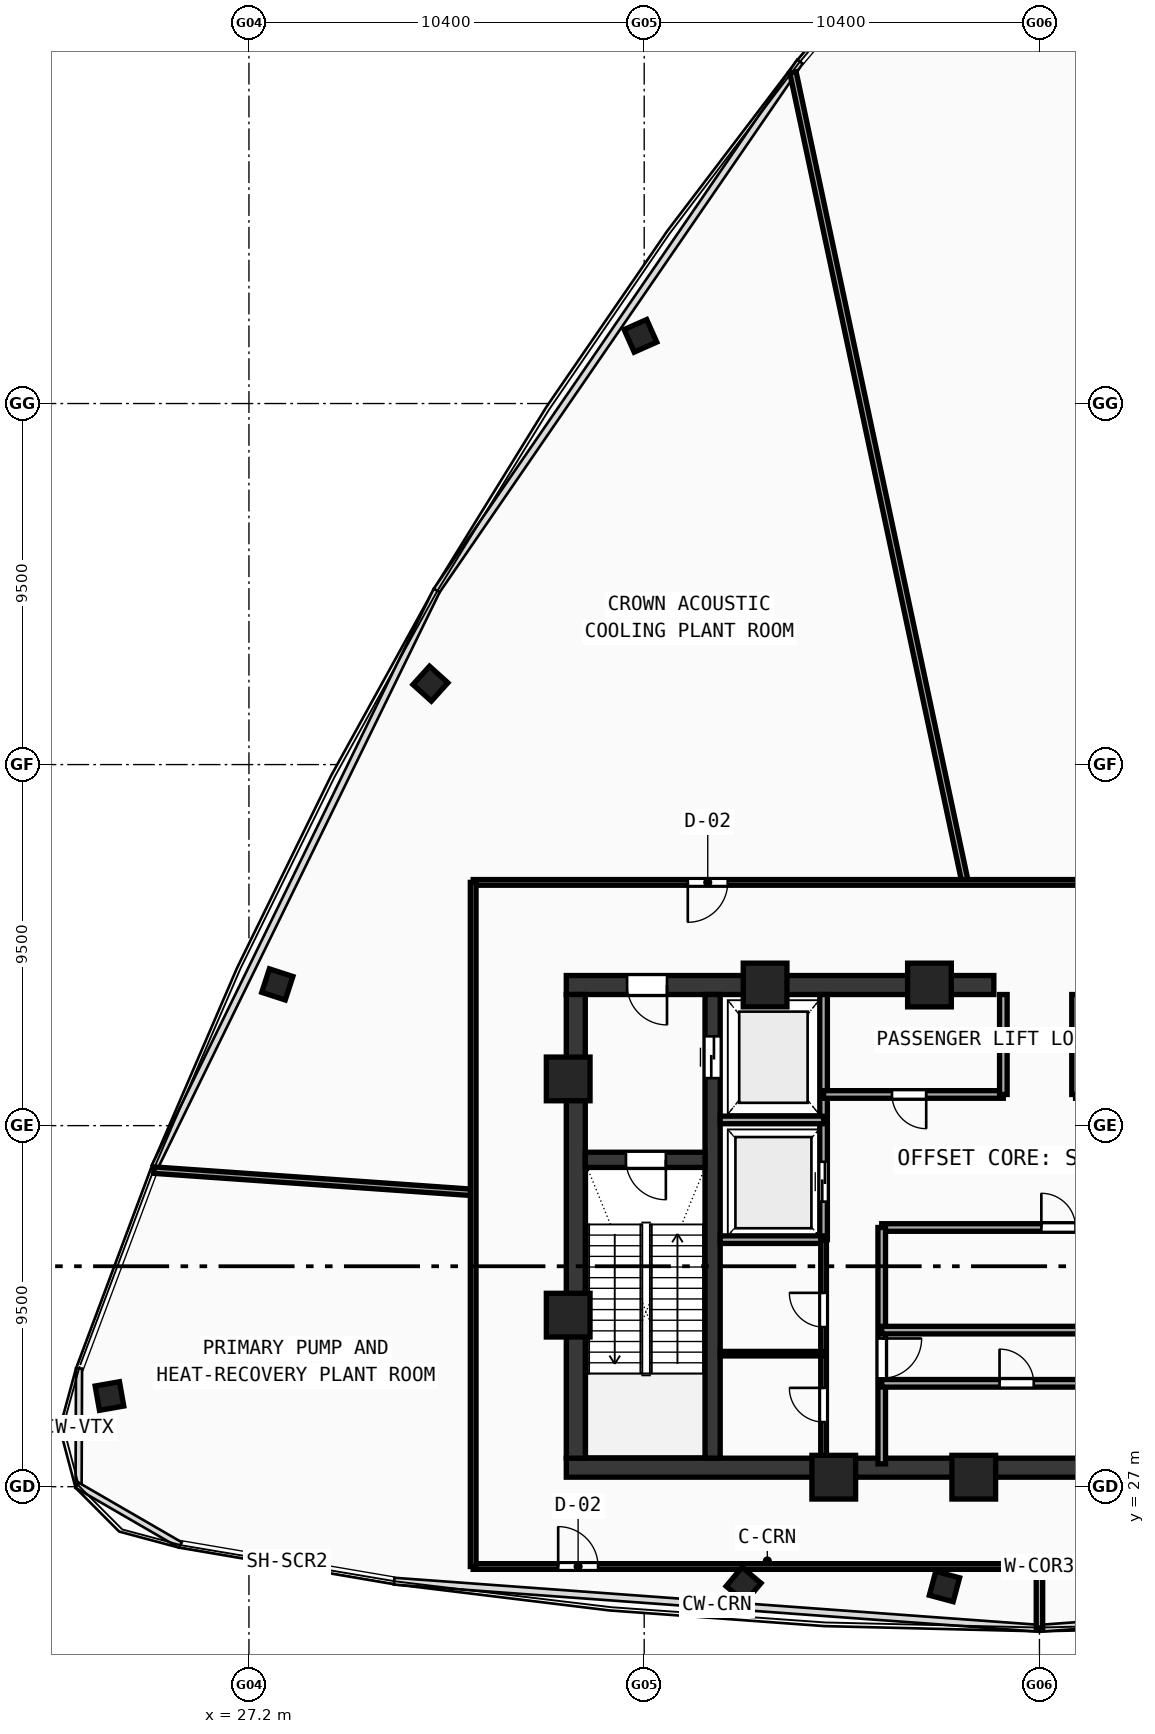
"""IFC4 building model, lengths in metres.
Left out: names, types, materials, properties, quantities, classifications, styles, units other than length and angle.
Written with IfcOpenShell. Run it as: python <this file> out.ifc"""

import sys

from ifc_helpers import new_model, si_unit, direction, frame, frame_2d, origin, origin_with_axes, origin_2d, place, context, subcontext, project, spatial, rectangle, hollow_rectangle, extrude, source, transform, mapped, element, fill, save


model = new_model("IFC4")
c1 = context("Model", 3, precision=1e-05, world=origin(), true_north=direction((0.0, 1.0)))
c2 = subcontext(c1, "Body", "Model", "MODEL_VIEW")
j1 = project(units=[si_unit("LENGTHUNIT", "METRE"), si_unit("PLANEANGLEUNIT", "RADIAN")], contexts=[c1])
p1 = place(None, origin())
s1 = spatial("IfcSite", under=j1, at=p1, CompositionType="ELEMENT")
p2 = place(p1, origin())
s2 = spatial("IfcBuilding", under=s1, at=p2, CompositionType="ELEMENT")
p3 = place(p2, frame((0.0, 0.0, 386.76)))
s3 = spatial("IfcBuildingStorey", under=s2, at=p3, CompositionType="ELEMENT", Elevation=386.76)
p4 = place(p3, frame((35.55, 27.5, 0.0), z_axis=(0.0, 0.0, 1.0), x_axis=(1.0, 0.0, 0.0)))
e1 = element("IfcWall", 1, at=p4, inside=s3, PredefinedType="SHEAR", context=c2, shape_type="SweptSolid", body=[
    extrude(rectangle(XDim=24.9, YDim=0.5, at=frame_2d((12.45, 0.0))), origin(), (0.0, 0.0, 1.0), 4.72),
])
p5 = place(p3, frame((35.55, 40.2, 0.0), z_axis=(0.0, 0.0, 1.0), x_axis=(1.0, 0.0, 0.0)))
e2 = element("IfcWall", 2, at=p5, inside=s3, PredefinedType="SHEAR", context=c2, shape_type="SweptSolid", body=[
    extrude(rectangle(XDim=11.25, YDim=0.5, at=frame_2d((5.625, 0.0))), origin(), (0.0, 0.0, 1.0), 4.72),
])
p6 = place(p5, frame((1.6, 0.0, 0.0)))
e3 = element("IfcOpeningElement", 3, at=p6, cuts=e2, PredefinedType="OPENING", context=c2, shape_type="SweptSolid", body=[
    extrude(rectangle(XDim=1.05, YDim=2.1, at=frame_2d((0.525, 1.05))), frame((0.0, 0.26, 0.0), z_axis=(0.0, -1.0, 0.0), x_axis=(1.0, 0.0, 0.0)), (0.0, 0.0, 1.0), 0.52),
])
p7 = place(p3, frame((35.8, 27.75, 0.0), z_axis=(0.0, 0.0, 1.0), x_axis=(0.0, 1.0, 0.0)))
e4 = element("IfcWall", 4, at=p7, inside=s3, PredefinedType="SHEAR", context=c2, shape_type="SweptSolid", body=[
    extrude(rectangle(XDim=12.2, YDim=0.5, at=frame_2d((6.1, 0.0))), origin(), (0.0, 0.0, 1.0), 4.72),
])
p8 = place(p3, frame((39.4, 27.75, 0.0), z_axis=(0.0, 0.0, 1.0), x_axis=(0.0, 1.0, 0.0)))
e5 = element("IfcWall", 5, at=p8, inside=s3, PredefinedType="SHEAR", context=c2, shape_type="SweptSolid", body=[
    extrude(rectangle(XDim=12.2, YDim=0.4, at=frame_2d((6.1, 0.0))), origin(), (0.0, 0.0, 1.0), 4.72),
])
p9 = place(p8, frame((10.0, 0.0, 0.0)))
e6 = element("IfcOpeningElement", 6, at=p9, cuts=e5, PredefinedType="OPENING", context=c2, shape_type="SweptSolid", body=[
    extrude(rectangle(XDim=1.1, YDim=2.1, at=frame_2d((0.55, 1.05))), frame((0.0, 0.21, 0.0), z_axis=(0.0, -1.0, 0.0), x_axis=(1.0, 0.0, 0.0)), (0.0, 0.0, 1.0), 0.42),
])
p10 = place(p3, frame((36.05, 35.6, 0.0), z_axis=(0.0, 0.0, 1.0), x_axis=(1.0, 0.0, 0.0)))
e7 = element("IfcWall", 7, at=p10, inside=s3, PredefinedType="SHEAR", context=c2, shape_type="SweptSolid", body=[
    extrude(rectangle(XDim=3.15, YDim=0.4, at=frame_2d((1.575, 0.0))), origin(), (0.0, 0.0, 1.0), 4.72),
])
p11 = place(p10, frame((1.07, 0.0, 0.0)))
e8 = element("IfcOpeningElement", 8, at=p11, cuts=e7, PredefinedType="OPENING", context=c2, shape_type="SweptSolid", body=[
    extrude(rectangle(XDim=1.05, YDim=2.1, at=frame_2d((0.525, 1.05))), frame((0.0, 0.21, 0.0), z_axis=(0.0, -1.0, 0.0), x_axis=(1.0, 0.0, 0.0)), (0.0, 0.0, 1.0), 0.42),
])
m1 = source(origin(), c2, "Body", "SweptSolid", [
    extrude(hollow_rectangle(XDim=1.15, YDim=1.15, WallThickness=0.048, at=origin_2d()), origin(), (0.0, 0.0, 1.0), 5.0),
])
for number, where, z_axis, x_axis in (
    (9, (42.588, 27.25, -0.28), (0.0, 0.0, 1.0), (1.0, 0.0, 0.0)),
    (10, (46.272, 27.25, -0.28), (0.0, 0.0, 1.0), (1.0, 0.0, 0.0)),
    (11, (45.106, 40.2, -0.28), (0.0, 0.0, 1.0), (1.0, 0.0, 0.0)),
    (12, (40.781, 40.2, -0.28), (0.0, 0.0, 1.0), (1.0, 0.0, 0.0)),
    (13, (35.6, 37.729, -0.28), (0.0, 0.0, 1.0), (1.0, 0.0, 0.0)),
    (14, (35.6, 31.513, -0.28), (0.0, 0.0, 1.0), (1.0, 0.0, 0.0)),
):
    element("IfcColumn", number, at=place(p3, frame(where, z_axis=z_axis, x_axis=x_axis)), inside=s3, PredefinedType="COLUMN", context=c2, shape_type="MappedRepresentation", body=[
        mapped(m1, transform((0.0, 0.0, 0.0), scale=1.0)),
    ])
m2 = source(origin(), c2, "Body", "SweptSolid", [
    extrude(hollow_rectangle(XDim=0.65, YDim=0.65, WallThickness=0.024, at=origin_2d()), origin(), (0.0, 0.0, 1.0), 5.0),
])
for number, where, z_axis, x_axis in (
    (15, (40.215, 24.422, -0.28), (0.0, 0.0, 1.0), (0.766, -0.643, 0.0)),
    (16, (45.501, 24.373, -0.28), (0.0, 0.0, 1.0), (0.966, -0.259, 0.0)),
    (17, (37.501, 57.281, -0.28), (0.0, 0.0, 1.0), (-0.914, -0.407, 0.0)),
    (18, (31.975, 48.129, -0.28), (0.0, 0.0, 1.0), (-0.669, -0.743, 0.0)),
    (19, (27.947, 40.216, -0.28), (0.0, 0.0, 1.0), (-0.309, -0.951, 0.0)),
    (20, (23.53, 29.385, -0.28), (0.0, 0.0, 1.0), (0.174, -0.985, 0.0)),
):
    element("IfcColumn", number, at=place(p3, frame(where, z_axis=z_axis, x_axis=x_axis)), inside=s3, PredefinedType="COLUMN", context=c2, shape_type="MappedRepresentation", body=[
        mapped(m2, transform((0.0, 0.0, 0.0), scale=1.0)),
    ])
p12 = place(p3, frame((42.32, 33.5, 0.0), z_axis=(0.0, 0.0, 1.0), x_axis=(0.0, 1.0, 0.0)))
e21 = element("IfcWall", 21, at=p12, inside=s3, PredefinedType="SOLIDWALL", context=c2, shape_type="SweptSolid", body=[
    extrude(rectangle(XDim=6.45, YDim=0.2, at=frame_2d((3.225, 0.0))), origin(), (0.0, 0.0, 1.0), 4.72),
])
p13 = place(p12, frame((1.0, 0.0, 0.0)))
e22 = element("IfcOpeningElement", 22, at=p13, cuts=e21, PredefinedType="OPENING", context=c2, shape_type="SweptSolid", body=[
    extrude(rectangle(XDim=1.05, YDim=2.1, at=frame_2d((0.525, 1.05))), frame((0.0, 0.11, 0.0), z_axis=(0.0, -1.0, 0.0), x_axis=(1.0, 0.0, 0.0)), (0.0, 0.0, 1.0), 0.22),
])
for number, where, z_axis, x_axis in (
    (23, (39.6, 36.65, 0.0), (0.0, 0.0, 1.0), (1.0, 0.0, 0.0)),
    (24, (39.6, 33.5, 0.0), (0.0, 0.0, 1.0), (1.0, 0.0, 0.0)),
):
    element("IfcWall", number, at=place(p3, frame(where, z_axis=z_axis, x_axis=x_axis)), inside=s3, PredefinedType="SOLIDWALL", context=c2, shape_type="SweptSolid", body=[
        extrude(rectangle(XDim=2.72, YDim=0.2, at=frame_2d((1.36, 0.0))), origin(), (0.0, 0.0, 1.0), 4.72),
    ])
p14 = place(p3, frame((42.32, 37.32, 0.0), z_axis=(0.0, 0.0, 1.0), x_axis=(1.0, 0.0, 0.0)))
e25 = element("IfcWall", 25, at=p14, inside=s3, PredefinedType="SOLIDWALL", context=c2, shape_type="SweptSolid", body=[
    extrude(rectangle(XDim=4.73, YDim=0.2, at=frame_2d((2.365, 0.0))), origin(), (0.0, 0.0, 1.0), 4.72),
])
p15 = place(p14, frame((1.8, 0.0, 0.0)))
e26 = element("IfcOpeningElement", 26, at=p15, cuts=e25, PredefinedType="OPENING", context=c2, shape_type="SweptSolid", body=[
    extrude(rectangle(XDim=0.9, YDim=2.1, at=frame_2d((0.45, 1.05))), frame((0.0, 0.11, 0.0), z_axis=(0.0, -1.0, 0.0), x_axis=(1.0, 0.0, 0.0)), (0.0, 0.0, 1.0), 0.22),
])
for number, where, z_axis, x_axis in (
    (27, (47.05, 37.32, 0.0), (0.0, 0.0, 1.0), (0.0, 1.0, 0.0)),
    (28, (48.95, 37.32, 0.0), (0.0, 0.0, 1.0), (0.0, 1.0, 0.0)),
):
    element("IfcWall", number, at=place(p3, frame(where, z_axis=z_axis, x_axis=x_axis)), inside=s3, PredefinedType="SOLIDWALL", context=c2, shape_type="SweptSolid", body=[
        extrude(rectangle(XDim=2.63, YDim=0.2, at=frame_2d((1.315, 0.0))), origin(), (0.0, 0.0, 1.0), 4.72),
    ])
p16 = place(p3, frame((43.85, 33.82, 0.0), z_axis=(0.0, 0.0, 1.0), x_axis=(1.0, 0.0, 0.0)))
e29 = element("IfcWall", 29, at=p16, inside=s3, PredefinedType="SOLIDWALL", context=c2, shape_type="SweptSolid", body=[
    extrude(rectangle(XDim=9.83, YDim=0.2, at=frame_2d((4.915, 0.0))), origin(), (0.0, 0.0, 1.0), 4.72),
])
p17 = place(p16, frame((4.2, 0.0, 0.0)))
e30 = element("IfcOpeningElement", 30, at=p17, cuts=e29, PredefinedType="OPENING", context=c2, shape_type="SweptSolid", body=[
    extrude(rectangle(XDim=0.9, YDim=2.1, at=frame_2d((0.45, 1.05))), frame((0.0, 0.11, 0.0), z_axis=(0.0, -1.0, 0.0), x_axis=(1.0, 0.0, 0.0)), (0.0, 0.0, 1.0), 0.22),
])
p18 = place(p3, frame((43.85, 27.6, 0.0), z_axis=(0.0, 0.0, 1.0), x_axis=(0.0, 1.0, 0.0)))
e31 = element("IfcWall", 31, at=p18, inside=s3, PredefinedType="SOLIDWALL", context=c2, shape_type="SweptSolid", body=[
    extrude(rectangle(XDim=6.22, YDim=0.2, at=frame_2d((3.11, 0.0))), origin(), (0.0, 0.0, 1.0), 4.72),
])
p19 = place(p18, frame((2.25, 0.0, 0.0)))
e32 = element("IfcOpeningElement", 32, at=p19, cuts=e31, PredefinedType="OPENING", context=c2, shape_type="SweptSolid", body=[
    extrude(rectangle(XDim=1.05, YDim=2.1, at=frame_2d((0.525, 1.05))), frame((0.0, 0.11, 0.0), z_axis=(0.0, -1.0, 0.0), x_axis=(1.0, 0.0, 0.0)), (0.0, 0.0, 1.0), 0.22),
])
p20 = place(p3, frame((43.85, 29.72, 0.0), z_axis=(0.0, 0.0, 1.0), x_axis=(1.0, 0.0, 0.0)))
e33 = element("IfcWall", 33, at=p20, inside=s3, PredefinedType="SOLIDWALL", context=c2, shape_type="SweptSolid", body=[
    extrude(rectangle(XDim=7.2, YDim=0.2, at=frame_2d((3.6, 0.0))), origin(), (0.0, 0.0, 1.0), 4.72),
])
p21 = place(p20, frame((3.1, 0.0, 0.0)))
e34 = element("IfcOpeningElement", 34, at=p21, cuts=e33, PredefinedType="OPENING", context=c2, shape_type="SweptSolid", body=[
    extrude(rectangle(XDim=0.9, YDim=2.1, at=frame_2d((0.45, 1.05))), frame((0.0, 0.11, 0.0), z_axis=(0.0, -1.0, 0.0), x_axis=(1.0, 0.0, 0.0)), (0.0, 0.0, 1.0), 0.22),
])
p22 = place(p3, frame((43.85, 31.12, 0.0), z_axis=(0.0, 0.0, 1.0), x_axis=(1.0, 0.0, 0.0)))
e35 = element("IfcWall", 35, at=p22, inside=s3, PredefinedType="SOLIDWALL", context=c2, shape_type="SweptSolid", body=[
    extrude(rectangle(XDim=9.83, YDim=0.2, at=frame_2d((4.915, 0.0))), origin(), (0.0, 0.0, 1.0), 4.72),
])
p23 = place(p3, frame((42.32, 27.6, 0.0), z_axis=(0.0, 0.0, 1.0), x_axis=(0.0, 1.0, 0.0)))
e36 = element("IfcWall", 36, at=p23, inside=s3, PredefinedType="PARTITIONING", context=c2, shape_type="SweptSolid", body=[
    extrude(rectangle(XDim=5.9, YDim=0.15, at=frame_2d((2.95, 0.0))), origin(), (0.0, 0.0, 1.0), 4.72),
])
p24 = place(p23, frame((1.1, 0.0, 0.0)))
e37 = element("IfcOpeningElement", 37, at=p24, cuts=e36, PredefinedType="OPENING", context=c2, shape_type="SweptSolid", body=[
    extrude(rectangle(XDim=0.9, YDim=2.1, at=frame_2d((0.45, 1.05))), frame((0.0, 0.085, 0.0), z_axis=(0.0, -1.0, 0.0), x_axis=(1.0, 0.0, 0.0)), (0.0, 0.0, 1.0), 0.17),
])
p25 = place(p23, frame((3.6, 0.0, 0.0)))
e38 = element("IfcOpeningElement", 38, at=p25, cuts=e36, PredefinedType="OPENING", context=c2, shape_type="SweptSolid", body=[
    extrude(rectangle(XDim=0.9, YDim=2.1, at=frame_2d((0.45, 1.05))), frame((0.0, 0.085, 0.0), z_axis=(0.0, -1.0, 0.0), x_axis=(1.0, 0.0, 0.0)), (0.0, 0.0, 1.0), 0.17),
])
p26 = place(p3, frame((39.6, 30.5, 0.0), z_axis=(0.0, 0.0, 1.0), x_axis=(1.0, 0.0, 0.0)))
e39 = element("IfcWall", 39, at=p26, inside=s3, PredefinedType="PARTITIONING", context=c2, shape_type="SweptSolid", body=[
    extrude(rectangle(XDim=2.72, YDim=0.12, at=frame_2d((1.36, 0.0))), origin(), (0.0, 0.0, 1.0), 4.72),
])
p27 = place(p3, frame((46.044, 42.9, 0.0), z_axis=(0.0, 0.0, 1.0), x_axis=(-0.207906465553, 0.978148711384, 0.0)))
e40 = element("IfcWall", 40, at=p27, inside=s3, PredefinedType="PARTITIONING", context=c2, shape_type="SweptSolid", body=[
    extrude(rectangle(XDim=21.788, YDim=0.17, at=frame_2d((10.894, 0.0))), origin(), (0.0, 0.0, 1.0), 4.12),
])
p28 = place(p3, frame((33.1, 34.742, 0.0), z_axis=(0.0, 0.0, 1.0), x_axis=(-0.997563993403, 0.069757286835, 0.0)))
e41 = element("IfcWall", 41, at=p28, inside=s3, PredefinedType="PARTITIONING", context=c2, shape_type="SweptSolid", body=[
    extrude(rectangle(XDim=8.421, YDim=0.17, at=frame_2d((4.21, 0.0))), origin(), (0.0, 0.0, 1.0), 4.12),
])
p29 = place(p3, frame((48.0, 24.9, 0.0), z_axis=(0.0, 0.0, 1.0), x_axis=(0.0, -1.0, 0.0)))
e42 = element("IfcWall", 42, at=p29, inside=s3, PredefinedType="PARTITIONING", context=c2, shape_type="SweptSolid", body=[
    extrude(rectangle(XDim=1.616, YDim=0.17, at=frame_2d((0.808, 0.0))), origin(), (0.0, 0.0, 1.0), 4.12),
])
p30 = place(p3, frame((33.1, 24.9, 0.0), z_axis=(0.0, 0.0, 1.0), x_axis=(1.0, 0.0, 0.0)))
e43 = element("IfcWall", 43, at=p30, inside=s3, PredefinedType="PARTITIONING", context=c2, shape_type="SweptSolid", body=[
    extrude(rectangle(XDim=29.8, YDim=0.15, at=frame_2d((14.9, 0.0))), origin(), (0.0, 0.0, 1.0), 4.12),
])
p31 = place(p30, frame((2.236, 0.0, 0.0)))
e44 = element("IfcOpeningElement", 44, at=p31, cuts=e43, PredefinedType="OPENING", context=c2, shape_type="SweptSolid", body=[
    extrude(rectangle(XDim=1.05, YDim=2.1, at=frame_2d((0.525, 1.05))), frame((0.0, 0.085, 0.0), z_axis=(0.0, -1.0, 0.0), x_axis=(1.0, 0.0, 0.0)), (0.0, 0.0, 1.0), 0.17),
])
p32 = place(p30, frame((26.514, 0.0, 0.0)))
e45 = element("IfcOpeningElement", 45, at=p32, cuts=e43, PredefinedType="OPENING", context=c2, shape_type="SweptSolid", body=[
    extrude(rectangle(XDim=1.05, YDim=2.1, at=frame_2d((0.525, 1.05))), frame((0.0, 0.085, 0.0), z_axis=(0.0, -1.0, 0.0), x_axis=(1.0, 0.0, 0.0)), (0.0, 0.0, 1.0), 0.17),
])
p33 = place(p3, frame((62.9, 42.9, 0.0), z_axis=(0.0, 0.0, 1.0), x_axis=(-1.0, 0.0, 0.0)))
e46 = element("IfcWall", 46, at=p33, inside=s3, PredefinedType="PARTITIONING", context=c2, shape_type="SweptSolid", body=[
    extrude(rectangle(XDim=29.8, YDim=0.15, at=frame_2d((14.9, 0.0))), origin(), (0.0, 0.0, 1.0), 4.12),
])
p34 = place(p33, frame((7.603, 0.0, 0.0)))
e47 = element("IfcOpeningElement", 47, at=p34, cuts=e46, PredefinedType="OPENING", context=c2, shape_type="SweptSolid", body=[
    extrude(rectangle(XDim=1.05, YDim=2.1, at=frame_2d((0.525, 1.05))), frame((0.0, 0.085, 0.0), z_axis=(0.0, -1.0, 0.0), x_axis=(1.0, 0.0, 0.0)), (0.0, 0.0, 1.0), 0.17),
])
p35 = place(p33, frame((23.103, 0.0, 0.0)))
e48 = element("IfcOpeningElement", 48, at=p35, cuts=e46, PredefinedType="OPENING", context=c2, shape_type="SweptSolid", body=[
    extrude(rectangle(XDim=1.05, YDim=2.1, at=frame_2d((0.525, 1.05))), frame((0.0, 0.085, 0.0), z_axis=(0.0, -1.0, 0.0), x_axis=(1.0, 0.0, 0.0)), (0.0, 0.0, 1.0), 0.17),
])
p36 = place(p3, frame((33.1, 42.9, 0.0), z_axis=(0.0, 0.0, 1.0), x_axis=(0.0, -1.0, 0.0)))
e49 = element("IfcWall", 49, at=p36, inside=s3, PredefinedType="PARTITIONING", context=c2, shape_type="SweptSolid", body=[
    extrude(rectangle(XDim=18.0, YDim=0.15, at=frame_2d((9.0, 0.0))), origin(), (0.0, 0.0, 1.0), 4.12),
])
m3 = source(origin(), c2, "Body", "SweptSolid", [
    extrude(rectangle(XDim=1.05, YDim=2.1, at=frame_2d((0.525, 1.05))), frame((0.0, 0.025, 0.0), z_axis=(0.0, -1.0, 0.0), x_axis=(1.0, 0.0, 0.0)), (0.0, 0.0, 1.0), 0.05),
])
p37 = place(p11, frame((1.05, 0.0, 0.0), z_axis=(0.0, 0.0, 1.0), x_axis=(-1.0, 0.0, 0.0)))
e50 = element("IfcDoor", 50, at=p37, inside=s3, OperationType="SINGLE_SWING_LEFT", PredefinedType="DOOR", context=c2, shape_type="MappedRepresentation", body=[
    mapped(m3, transform((0.0, 0.0, 0.0), scale=1.0)),
])
fill(e8, e50)
p38 = place(p6, frame((1.05, 0.0, 0.0), z_axis=(0.0, 0.0, 1.0), x_axis=(-1.0, 0.0, 0.0)))
e51 = element("IfcDoor", 51, at=p38, inside=s3, OperationType="SINGLE_SWING_LEFT", PredefinedType="DOOR", context=c2, shape_type="MappedRepresentation", body=[
    mapped(m3, transform((0.0, 0.0, 0.0), scale=1.0)),
])
fill(e3, e51)
m4 = source(origin(), c2, "Body", "SweptSolid", [
    extrude(rectangle(XDim=1.1, YDim=2.1, at=frame_2d((0.55, 1.05))), frame((0.0, 0.025, 0.0), z_axis=(0.0, -1.0, 0.0), x_axis=(1.0, 0.0, 0.0)), (0.0, 0.0, 1.0), 0.05),
])
p39 = place(p9, frame((1.1, 0.0, 0.0), z_axis=(0.0, 0.0, 1.0), x_axis=(-1.0, 0.0, 0.0)))
e52 = element("IfcDoor", 52, at=p39, inside=s3, OperationType="DOUBLE_DOOR_SLIDING", PredefinedType="DOOR", context=c2, shape_type="MappedRepresentation", body=[
    mapped(m4, transform((0.0, 0.0, 0.0), scale=1.0)),
])
fill(e6, e52)
p40 = place(p13, origin_with_axes())
e53 = element("IfcDoor", 53, at=p40, inside=s3, OperationType="DOUBLE_DOOR_SLIDING", PredefinedType="DOOR", context=c2, shape_type="MappedRepresentation", body=[
    mapped(m3, transform((0.0, 0.0, 0.0), scale=1.0)),
])
fill(e22, e53)
m5 = source(origin(), c2, "Body", "SweptSolid", [
    extrude(rectangle(XDim=0.9, YDim=2.1, at=frame_2d((0.45, 1.05))), frame((0.0, 0.025, 0.0), z_axis=(0.0, -1.0, 0.0), x_axis=(1.0, 0.0, 0.0)), (0.0, 0.0, 1.0), 0.05),
])
p41 = place(p15, frame((0.9, 0.0, 0.0), z_axis=(0.0, 0.0, 1.0), x_axis=(-1.0, 0.0, 0.0)))
e54 = element("IfcDoor", 54, at=p41, inside=s3, OperationType="SINGLE_SWING_LEFT", PredefinedType="DOOR", context=c2, shape_type="MappedRepresentation", body=[
    mapped(m5, transform((0.0, 0.0, 0.0), scale=1.0)),
])
fill(e26, e54)
p42 = place(p17, origin_with_axes())
e55 = element("IfcDoor", 55, at=p42, inside=s3, OperationType="SINGLE_SWING_LEFT", PredefinedType="DOOR", context=c2, shape_type="MappedRepresentation", body=[
    mapped(m5, transform((0.0, 0.0, 0.0), scale=1.0)),
])
fill(e30, e55)
p43 = place(p19, frame((1.05, 0.0, 0.0), z_axis=(0.0, 0.0, 1.0), x_axis=(-1.0, 0.0, 0.0)))
e56 = element("IfcDoor", 56, at=p43, inside=s3, OperationType="SINGLE_SWING_LEFT", PredefinedType="DOOR", context=c2, shape_type="MappedRepresentation", body=[
    mapped(m3, transform((0.0, 0.0, 0.0), scale=1.0)),
])
fill(e32, e56)
p44 = place(p21, origin_with_axes())
e57 = element("IfcDoor", 57, at=p44, inside=s3, OperationType="SINGLE_SWING_LEFT", PredefinedType="DOOR", context=c2, shape_type="MappedRepresentation", body=[
    mapped(m5, transform((0.0, 0.0, 0.0), scale=1.0)),
])
fill(e34, e57)
p45 = place(p24, origin_with_axes())
e58 = element("IfcDoor", 58, at=p45, inside=s3, OperationType="SINGLE_SWING_RIGHT", PredefinedType="DOOR", context=c2, shape_type="MappedRepresentation", body=[
    mapped(m5, transform((0.0, 0.0, 0.0), scale=1.0)),
])
fill(e37, e58)
p46 = place(p25, origin_with_axes())
e59 = element("IfcDoor", 59, at=p46, inside=s3, OperationType="SINGLE_SWING_RIGHT", PredefinedType="DOOR", context=c2, shape_type="MappedRepresentation", body=[
    mapped(m5, transform((0.0, 0.0, 0.0), scale=1.0)),
])
fill(e38, e59)
p47 = place(p35, origin_with_axes())
e60 = element("IfcDoor", 60, at=p47, inside=s3, OperationType="SINGLE_SWING_RIGHT", PredefinedType="DOOR", context=c2, shape_type="MappedRepresentation", body=[
    mapped(m3, transform((0.0, 0.0, 0.0), scale=1.0)),
])
fill(e48, e60)
p48 = place(p31, origin_with_axes())
e61 = element("IfcDoor", 61, at=p48, inside=s3, OperationType="SINGLE_SWING_LEFT", PredefinedType="DOOR", context=c2, shape_type="MappedRepresentation", body=[
    mapped(m3, transform((0.0, 0.0, 0.0), scale=1.0)),
])
fill(e44, e61)
save(model, sys.argv[1])
